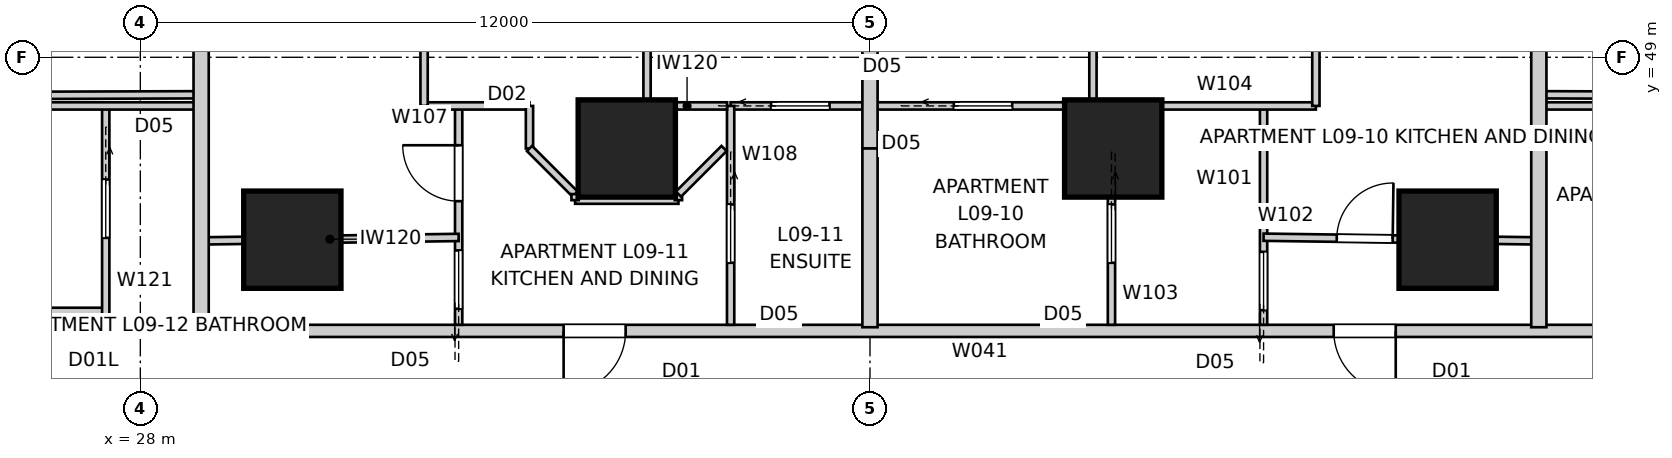
"""IFC4 building model, lengths in metres.
Left out: names, types, materials, properties, quantities, classifications, styles, units other than length and angle.
Written with IfcOpenShell. Run it as: python <this file> out.ifc"""

import sys

from ifc_helpers import new_model, si_unit, direction, frame, frame_2d, origin, origin_2d, place, context, subcontext, project, spatial, rectangle, extrude, element, fill, save


model = new_model("IFC4")
c1 = context("Model", 3, precision=1e-05, world=origin(), true_north=direction((0.0, 1.0)))
c2 = subcontext(c1, "Body", "Model", "MODEL_VIEW")
j1 = project(units=[si_unit("LENGTHUNIT", "METRE"), si_unit("PLANEANGLEUNIT", "RADIAN")], contexts=[c1])
p1 = place(None, origin())
s1 = spatial("IfcSite", under=j1, at=p1, CompositionType="ELEMENT")
p2 = place(p1, origin())
s2 = spatial("IfcBuilding", under=s1, at=p2, CompositionType="ELEMENT")
p3 = place(p2, frame((0.0, 0.0, 35.4)))
s3 = spatial("IfcBuildingStorey", under=s2, at=p3, CompositionType="ELEMENT", Elevation=35.4)
for number, where, z_axis, x_axis in (
    (1, (49.5, 46.0, 0.0), (0.0, 0.0, 1.0), (1.0, 0.0, 0.0)),
    (2, (44.0, 47.5, 0.0), (0.0, 0.0, 1.0), (1.0, 0.0, 0.0)),
    (3, (36.0, 47.5, 0.0), (0.0, 0.0, 1.0), (1.0, 0.0, 0.0)),
    (4, (30.5, 46.0, 0.0), (0.0, 0.0, 1.0), (1.0, 0.0, 0.0)),
):
    element("IfcColumn", number, at=place(p3, frame(where, z_axis=z_axis, x_axis=x_axis)), inside=s3, PredefinedType="COLUMN", context=c2, shape_type="SweptSolid", body=[
        extrude(rectangle(XDim=1.6, YDim=1.6, at=origin_2d()), origin(), (0.0, 0.0, 1.0), 3.4),
    ])
p4 = place(p3, frame((54.5, 44.5, 0.0), z_axis=(0.0, 0.0, 1.0), x_axis=(-1.0, 0.0, 0.0)))
e5 = element("IfcWall", 5, at=p4, inside=s3, PredefinedType="PARTITIONING", context=c2, shape_type="SweptSolid", body=[
    extrude(rectangle(XDim=28.2, YDim=0.2, at=frame_2d((14.1, 0.0))), origin(), (0.0, 0.0, 1.0), 3.25),
])
p5 = place(p4, frame((5.854, 0.0, 0.0)))
e6 = element("IfcOpeningElement", 6, at=p5, cuts=e5, PredefinedType="OPENING", context=c2, shape_type="SweptSolid", body=[
    extrude(rectangle(XDim=1.02, YDim=2.34, at=frame_2d((0.51, 1.17))), frame((0.0, 0.11, 0.0), z_axis=(0.0, -1.0, 0.0), x_axis=(1.0, 0.0, 0.0)), (0.0, 0.0, 1.0), 0.22),
])
p6 = place(p4, frame((18.518, 0.0, 0.0)))
e7 = element("IfcOpeningElement", 7, at=p6, cuts=e5, PredefinedType="OPENING", context=c2, shape_type="SweptSolid", body=[
    extrude(rectangle(XDim=1.02, YDim=2.34, at=frame_2d((0.51, 1.17))), frame((0.0, 0.11, 0.0), z_axis=(0.0, -1.0, 0.0), x_axis=(1.0, 0.0, 0.0)), (0.0, 0.0, 1.0), 0.22),
])
p7 = place(p4, frame((1.415, 0.0, 0.0)))
e8 = element("IfcOpeningElement", 8, at=p7, cuts=e5, PredefinedType="OPENING", context=c2, shape_type="SweptSolid", body=[
    extrude(rectangle(XDim=1.02, YDim=2.34, at=frame_2d((0.51, 1.17))), frame((0.0, 0.11, 0.0), z_axis=(0.0, -1.0, 0.0), x_axis=(1.0, 0.0, 0.0)), (0.0, 0.0, 1.0), 0.22),
])
for number, where, z_axis, x_axis in (
    (9, (51.0, 56.0, 0.0), (0.0, 0.0, 1.0), (0.0, -1.0, 0.0)),
    (10, (29.0, 56.0, 0.0), (0.0, 0.0, 1.0), (0.0, -1.0, 0.0)),
):
    element("IfcWall", number, at=place(p3, frame(where, z_axis=z_axis, x_axis=x_axis)), inside=s3, PredefinedType="PARTITIONING", context=c2, shape_type="SweptSolid", body=[
        extrude(rectangle(XDim=11.44, YDim=0.25, at=frame_2d((5.72, 0.0))), origin(), (0.0, 0.0, 1.0), 3.25),
    ])
p8 = place(p3, frame((40.0, 56.0, 0.0), z_axis=(0.0, 0.0, 1.0), x_axis=(0.0, -1.0, 0.0)))
e11 = element("IfcWall", 11, at=p8, inside=s3, PredefinedType="PARTITIONING", context=c2, shape_type="SweptSolid", body=[
    extrude(rectangle(XDim=8.5, YDim=0.25, at=frame_2d((4.25, 0.0))), origin(), (0.0, 0.0, 1.0), 3.25),
])
p9 = place(p3, frame((40.0, 47.5, 0.0), z_axis=(0.0, 0.0, 1.0), x_axis=(0.0, -1.0, 0.0)))
e12 = element("IfcWall", 12, at=p9, inside=s3, PredefinedType="PARTITIONING", context=c2, shape_type="SweptSolid", body=[
    extrude(rectangle(XDim=2.94, YDim=0.25, at=frame_2d((1.47, 0.0))), origin(), (0.0, 0.0, 1.0), 2.796),
])
p10 = place(p3, frame((51.0, 48.2, 0.0), z_axis=(0.0, 0.0, 1.0), x_axis=(1.0, 0.0, 0.0)))
e13 = element("IfcWall", 13, at=p10, inside=s3, PredefinedType="PARTITIONING", context=c2, shape_type="SweptSolid", body=[
    extrude(rectangle(XDim=7.2, YDim=0.12, at=frame_2d((3.6, 0.0))), origin(), (0.0, 0.0, 1.0), 3.25),
])
p11 = place(p3, frame((51.0, 48.383, 0.0), z_axis=(0.0, 0.0, 1.0), x_axis=(0.9999944038, -0.003345499915, 0.0)))
e14 = element("IfcWall", 14, at=p11, inside=s3, PredefinedType="PARTITIONING", context=c2, shape_type="SweptSolid", body=[
    extrude(rectangle(XDim=14.96, YDim=0.12, at=frame_2d((7.48, 0.0))), origin(), (0.0, 0.0, 1.0), 3.25),
])
p12 = place(p11, frame((12.515, 0.0, 0.0)))
e15 = element("IfcOpeningElement", 15, at=p12, cuts=e14, PredefinedType="OPENING", context=c2, shape_type="SweptSolid", body=[
    extrude(rectangle(XDim=0.92, YDim=2.34, at=frame_2d((0.46, 1.17))), frame((0.0, 0.07, 0.0), z_axis=(0.0, -1.0, 0.0), x_axis=(1.0, 0.0, 0.0)), (0.0, 0.0, 1.0), 0.14),
])
p13 = place(p11, frame((8.732, 0.0, 0.0)))
e16 = element("IfcOpeningElement", 16, at=p13, cuts=e14, PredefinedType="OPENING", context=c2, shape_type="SweptSolid", body=[
    extrude(rectangle(XDim=0.92, YDim=2.34, at=frame_2d((0.46, 1.17))), frame((0.0, 0.07, 0.0), z_axis=(0.0, -1.0, 0.0), x_axis=(1.0, 0.0, 0.0)), (0.0, 0.0, 1.0), 0.14),
])
p14 = place(p3, frame((46.473, 44.6, 0.0), z_axis=(0.0, 0.0, 1.0), x_axis=(0.0, 1.0, 0.0)))
e17 = element("IfcWall", 17, at=p14, inside=s3, PredefinedType="PARTITIONING", context=c2, shape_type="SweptSolid", body=[
    extrude(rectangle(XDim=3.6, YDim=0.12, at=frame_2d((1.8, 0.0))), origin(), (0.0, 0.0, 1.0), 3.25),
])
p15 = place(p14, frame((0.24, 0.0, 0.0)))
e18 = element("IfcOpeningElement", 18, at=p15, cuts=e17, PredefinedType="OPENING", context=c2, shape_type="SweptSolid", body=[
    extrude(rectangle(XDim=0.96, YDim=2.1, at=frame_2d((0.48, 1.05))), frame((0.0, 0.07, 0.0), z_axis=(0.0, -1.0, 0.0), x_axis=(1.0, 0.0, 0.0)), (0.0, 0.0, 1.0), 0.14),
])
p16 = place(p3, frame((46.473, 46.041, 0.0), z_axis=(0.0, 0.0, 1.0), x_axis=(0.999909127846, -0.013480951408, 0.0)))
e19 = element("IfcWall", 19, at=p16, inside=s3, PredefinedType="PARTITIONING", context=c2, shape_type="SweptSolid", body=[
    extrude(rectangle(XDim=4.528, YDim=0.12, at=frame_2d((2.264, 0.0))), origin(), (0.0, 0.0, 1.0), 2.549),
])
p17 = place(p16, frame((1.204, 0.0, 0.0)))
e20 = element("IfcOpeningElement", 20, at=p17, cuts=e19, PredefinedType="OPENING", context=c2, shape_type="SweptSolid", body=[
    extrude(rectangle(XDim=0.92, YDim=2.34, at=frame_2d((0.46, 1.17))), frame((0.0, 0.07, 0.0), z_axis=(0.0, -1.0, 0.0), x_axis=(1.0, 0.0, 0.0)), (0.0, 0.0, 1.0), 0.14),
])
p18 = place(p3, frame((43.971, 48.2, 0.0), z_axis=(0.0, 0.0, 1.0), x_axis=(0.0, -1.0, 0.0)))
e21 = element("IfcWall", 21, at=p18, inside=s3, PredefinedType="PARTITIONING", context=c2, shape_type="SweptSolid", body=[
    extrude(rectangle(XDim=3.6, YDim=0.12, at=frame_2d((1.8, 0.0))), origin(), (0.0, 0.0, 1.0), 3.25),
])
p19 = place(p18, frame((1.62, 0.0, 0.0)))
e22 = element("IfcOpeningElement", 22, at=p19, cuts=e21, PredefinedType="OPENING", context=c2, shape_type="SweptSolid", body=[
    extrude(rectangle(XDim=0.96, YDim=2.1, at=frame_2d((0.48, 1.05))), frame((0.0, 0.07, 0.0), z_axis=(0.0, -1.0, 0.0), x_axis=(1.0, 0.0, 0.0)), (0.0, 0.0, 1.0), 0.14),
])
p20 = place(p3, frame((37.708, 48.2, 0.0), z_axis=(0.0, 0.0, 1.0), x_axis=(1.0, 0.0, 0.0)))
e23 = element("IfcWall", 23, at=p20, inside=s3, PredefinedType="PARTITIONING", context=c2, shape_type="SweptSolid", body=[
    extrude(rectangle(XDim=9.625, YDim=0.12, at=frame_2d((4.812, 0.0))), origin(), (0.0, 0.0, 1.0), 3.25),
])
p21 = place(p20, frame((0.666, 0.0, 0.0)))
e24 = element("IfcOpeningElement", 24, at=p21, cuts=e23, PredefinedType="OPENING", context=c2, shape_type="SweptSolid", body=[
    extrude(rectangle(XDim=0.96, YDim=2.1, at=frame_2d((0.48, 1.05))), frame((0.0, 0.07, 0.0), z_axis=(0.0, -1.0, 0.0), x_axis=(1.0, 0.0, 0.0)), (0.0, 0.0, 1.0), 0.14),
])
p22 = place(p20, frame((3.67, 0.0, 0.0)))
e25 = element("IfcOpeningElement", 25, at=p22, cuts=e23, PredefinedType="OPENING", context=c2, shape_type="SweptSolid", body=[
    extrude(rectangle(XDim=0.96, YDim=2.1, at=frame_2d((0.48, 1.05))), frame((0.0, 0.07, 0.0), z_axis=(0.0, -1.0, 0.0), x_axis=(1.0, 0.0, 0.0)), (0.0, 0.0, 1.0), 0.14),
])
p23 = place(p3, frame((47.333, 48.2, 0.0), z_axis=(0.0, 0.0, 1.0), x_axis=(0.0, 1.0, 0.0)))
e26 = element("IfcWall", 26, at=p23, inside=s3, PredefinedType="PARTITIONING", context=c2, shape_type="SweptSolid", body=[
    extrude(rectangle(XDim=7.76, YDim=0.12, at=frame_2d((3.88, 0.0))), origin(), (0.0, 0.0, 1.0), 3.25),
])
p24 = place(p23, frame((3.44, 0.0, 0.0)))
e27 = element("IfcOpeningElement", 27, at=p24, cuts=e26, PredefinedType="OPENING", context=c2, shape_type="SweptSolid", body=[
    extrude(rectangle(XDim=0.92, YDim=2.34, at=frame_2d((0.46, 1.17))), frame((0.0, 0.07, 0.0), z_axis=(0.0, -1.0, 0.0), x_axis=(1.0, 0.0, 0.0)), (0.0, 0.0, 1.0), 0.14),
])
p25 = place(p3, frame((43.667, 55.96, 0.0), z_axis=(0.0, 0.0, 1.0), x_axis=(0.0, -1.0, 0.0)))
e28 = element("IfcWall", 28, at=p25, inside=s3, PredefinedType="PARTITIONING", context=c2, shape_type="SweptSolid", body=[
    extrude(rectangle(XDim=7.76, YDim=0.12, at=frame_2d((3.88, 0.0))), origin(), (0.0, 0.0, 1.0), 3.25),
])
p26 = place(p3, frame((33.235, 44.6, 0.0), z_axis=(0.0, 0.0, 1.0), x_axis=(0.0, 1.0, 0.0)))
e29 = element("IfcWall", 29, at=p26, inside=s3, PredefinedType="PARTITIONING", context=c2, shape_type="SweptSolid", body=[
    extrude(rectangle(XDim=3.6, YDim=0.12, at=frame_2d((1.8, 0.0))), origin(), (0.0, 0.0, 1.0), 3.25),
])
p27 = place(p26, frame((2.033, 0.0, 0.0)))
e30 = element("IfcOpeningElement", 30, at=p27, cuts=e29, PredefinedType="OPENING", context=c2, shape_type="SweptSolid", body=[
    extrude(rectangle(XDim=0.92, YDim=2.34, at=frame_2d((0.46, 1.17))), frame((0.0, 0.07, 0.0), z_axis=(0.0, -1.0, 0.0), x_axis=(1.0, 0.0, 0.0)), (0.0, 0.0, 1.0), 0.14),
])
p28 = place(p26, frame((0.263, 0.0, 0.0)))
e31 = element("IfcOpeningElement", 31, at=p28, cuts=e29, PredefinedType="OPENING", context=c2, shape_type="SweptSolid", body=[
    extrude(rectangle(XDim=0.96, YDim=2.1, at=frame_2d((0.48, 1.05))), frame((0.0, 0.07, 0.0), z_axis=(0.0, -1.0, 0.0), x_axis=(1.0, 0.0, 0.0)), (0.0, 0.0, 1.0), 0.14),
])
p29 = place(p3, frame((37.708, 48.2, 0.0), z_axis=(0.0, 0.0, 1.0), x_axis=(0.0, -1.0, 0.0)))
e32 = element("IfcWall", 32, at=p29, inside=s3, PredefinedType="PARTITIONING", context=c2, shape_type="SweptSolid", body=[
    extrude(rectangle(XDim=3.6, YDim=0.12, at=frame_2d((1.8, 0.0))), origin(), (0.0, 0.0, 1.0), 3.25),
])
p30 = place(p29, frame((1.62, 0.0, 0.0)))
e33 = element("IfcOpeningElement", 33, at=p30, cuts=e32, PredefinedType="OPENING", context=c2, shape_type="SweptSolid", body=[
    extrude(rectangle(XDim=0.96, YDim=2.1, at=frame_2d((0.48, 1.05))), frame((0.0, 0.07, 0.0), z_axis=(0.0, -1.0, 0.0), x_axis=(1.0, 0.0, 0.0)), (0.0, 0.0, 1.0), 0.14),
])
p31 = place(p3, frame((32.667, 48.2, 0.0), z_axis=(0.0, 0.0, 1.0), x_axis=(1.0, 0.0, 0.0)))
e34 = element("IfcWall", 34, at=p31, inside=s3, PredefinedType="PARTITIONING", context=c2, shape_type="SweptSolid", body=[
    extrude(rectangle(XDim=1.733, YDim=0.12, at=frame_2d((0.867, 0.0))), origin(), (0.0, 0.0, 1.0), 3.25),
])
p32 = place(p3, frame((34.4, 48.2, 0.0), z_axis=(0.0, 0.0, 1.0), x_axis=(0.0, -1.0, 0.0)))
e35 = element("IfcWall", 35, at=p32, inside=s3, PredefinedType="PARTITIONING", context=c2, shape_type="SweptSolid", body=[
    extrude(rectangle(XDim=0.7, YDim=0.12, at=frame_2d((0.35, 0.0))), origin(), (0.0, 0.0, 1.0), 3.25),
])
p33 = place(p3, frame((34.4, 47.5, 0.0), z_axis=(0.0, 0.0, 1.0), x_axis=(0.707106781187, -0.707106781187, 0.0)))
e36 = element("IfcWall", 36, at=p33, inside=s3, PredefinedType="PARTITIONING", context=c2, shape_type="SweptSolid", body=[
    extrude(rectangle(XDim=1.061, YDim=0.12, at=frame_2d((0.53, 0.0))), origin(), (0.0, 0.0, 1.0), 3.25),
])
p34 = place(p3, frame((35.15, 46.65, 0.0), z_axis=(0.0, 0.0, 1.0), x_axis=(1.0, 0.0, 0.0)))
e37 = element("IfcWall", 37, at=p34, inside=s3, PredefinedType="PARTITIONING", context=c2, shape_type="SweptSolid", body=[
    extrude(rectangle(XDim=1.7, YDim=0.12, at=frame_2d((0.85, 0.0))), origin(), (0.0, 0.0, 1.0), 3.25),
])
p35 = place(p3, frame((36.85, 46.75, 0.0), z_axis=(0.0, 0.0, 1.0), x_axis=(0.707106781187, 0.707106781187, 0.0)))
e38 = element("IfcWall", 38, at=p35, inside=s3, PredefinedType="PARTITIONING", context=c2, shape_type="SweptSolid", body=[
    extrude(rectangle(XDim=1.061, YDim=0.12, at=frame_2d((0.53, 0.0))), origin(), (0.0, 0.0, 1.0), 3.25),
])
p36 = place(p3, frame((29.0, 45.98, 0.0), z_axis=(0.0, 0.0, 1.0), x_axis=(0.999909030942, 0.01348813704, 0.0)))
e39 = element("IfcWall", 39, at=p36, inside=s3, PredefinedType="PARTITIONING", context=c2, shape_type="SweptSolid", body=[
    extrude(rectangle(XDim=4.236, YDim=0.12, at=frame_2d((2.118, 0.0))), origin(), (0.0, 0.0, 1.0), 2.549),
])
p37 = place(p3, frame((37.65, 48.2, 0.0), z_axis=(0.0, 0.0, 1.0), x_axis=(-1.0, 0.0, 0.0)))
e40 = element("IfcWall", 40, at=p37, inside=s3, PredefinedType="PARTITIONING", context=c2, shape_type="SweptSolid", body=[
    extrude(rectangle(XDim=1.317, YDim=0.12, at=frame_2d((0.658, 0.0))), origin(), (0.0, 0.0, 1.0), 3.25),
])
p38 = place(p3, frame((36.333, 48.2, 0.0), z_axis=(0.0, 0.0, 1.0), x_axis=(0.0, 1.0, 0.0)))
e41 = element("IfcWall", 41, at=p38, inside=s3, PredefinedType="PARTITIONING", context=c2, shape_type="SweptSolid", body=[
    extrude(rectangle(XDim=7.76, YDim=0.12, at=frame_2d((3.88, 0.0))), origin(), (0.0, 0.0, 1.0), 3.25),
])
p39 = place(p38, frame((3.44, 0.0, 0.0)))
e42 = element("IfcOpeningElement", 42, at=p39, cuts=e41, PredefinedType="OPENING", context=c2, shape_type="SweptSolid", body=[
    extrude(rectangle(XDim=0.92, YDim=2.34, at=frame_2d((0.46, 1.17))), frame((0.0, 0.07, 0.0), z_axis=(0.0, -1.0, 0.0), x_axis=(1.0, 0.0, 0.0)), (0.0, 0.0, 1.0), 0.14),
])
p40 = place(p3, frame((32.667, 55.96, 0.0), z_axis=(0.0, 0.0, 1.0), x_axis=(0.0, -1.0, 0.0)))
e43 = element("IfcWall", 43, at=p40, inside=s3, PredefinedType="PARTITIONING", context=c2, shape_type="SweptSolid", body=[
    extrude(rectangle(XDim=7.76, YDim=0.12, at=frame_2d((3.88, 0.0))), origin(), (0.0, 0.0, 1.0), 3.25),
])
p41 = place(p3, frame((21.8, 44.821, 0.0), z_axis=(0.0, 0.0, 1.0), x_axis=(1.0, 0.0, 0.0)))
e44 = element("IfcWall", 44, at=p41, inside=s3, PredefinedType="PARTITIONING", context=c2, shape_type="SweptSolid", body=[
    extrude(rectangle(XDim=5.631, YDim=0.12, at=frame_2d((2.815, 0.0))), origin(), (0.0, 0.0, 1.0), 3.25),
])
p42 = place(p41, frame((2.355, 0.0, 0.0)))
e45 = element("IfcOpeningElement", 45, at=p42, cuts=e44, PredefinedType="OPENING", context=c2, shape_type="SweptSolid", body=[
    extrude(rectangle(XDim=0.92, YDim=2.34, at=frame_2d((0.46, 1.17))), frame((0.0, 0.07, 0.0), z_axis=(0.0, -1.0, 0.0), x_axis=(1.0, 0.0, 0.0)), (0.0, 0.0, 1.0), 0.14),
])
p43 = place(p3, frame((27.431, 48.2, 0.0), z_axis=(0.0, 0.0, 1.0), x_axis=(0.0, -1.0, 0.0)))
e46 = element("IfcWall", 46, at=p43, inside=s3, PredefinedType="PARTITIONING", context=c2, shape_type="SweptSolid", body=[
    extrude(rectangle(XDim=3.6, YDim=0.12, at=frame_2d((1.8, 0.0))), origin(), (0.0, 0.0, 1.0), 3.25),
])
p44 = place(p43, frame((1.209, 0.0, 0.0)))
e47 = element("IfcOpeningElement", 47, at=p44, cuts=e46, PredefinedType="OPENING", context=c2, shape_type="SweptSolid", body=[
    extrude(rectangle(XDim=0.96, YDim=2.1, at=frame_2d((0.48, 1.05))), frame((0.0, 0.07, 0.0), z_axis=(0.0, -1.0, 0.0), x_axis=(1.0, 0.0, 0.0)), (0.0, 0.0, 1.0), 0.14),
])
p45 = place(p3, frame((21.8, 48.2, 0.0), z_axis=(0.0, 0.0, 1.0), x_axis=(1.0, 0.0, 0.0)))
e48 = element("IfcWall", 48, at=p45, inside=s3, PredefinedType="PARTITIONING", context=c2, shape_type="SweptSolid", body=[
    extrude(rectangle(XDim=7.2, YDim=0.12, at=frame_2d((3.6, 0.0))), origin(), (0.0, 0.0, 1.0), 3.25),
])
p46 = place(p3, frame((14.04, 48.333, 0.0), z_axis=(0.0, 0.0, 1.0), x_axis=(0.9999944038, 0.003345499915, 0.0)))
e49 = element("IfcWall", 49, at=p46, inside=s3, PredefinedType="PARTITIONING", context=c2, shape_type="SweptSolid", body=[
    extrude(rectangle(XDim=14.96, YDim=0.12, at=frame_2d((7.48, 0.0))), origin(), (0.0, 0.0, 1.0), 3.25),
])
p47 = place(p46, frame((3.333, 0.0, 0.0)))
e50 = element("IfcOpeningElement", 50, at=p47, cuts=e49, PredefinedType="OPENING", context=c2, shape_type="SweptSolid", body=[
    extrude(rectangle(XDim=0.92, YDim=2.34, at=frame_2d((0.46, 1.17))), frame((0.0, 0.07, 0.0), z_axis=(0.0, -1.0, 0.0), x_axis=(1.0, 0.0, 0.0)), (0.0, 0.0, 1.0), 0.14),
])
for number, where, z_axis, x_axis in (
    (51, (35.15, 46.65, 0.0), (0.0, 0.0, 1.0), (0.0, 1.0, 0.0)),
    (52, (36.85, 46.65, 0.0), (0.0, 0.0, 1.0), (0.0, 1.0, 0.0)),
):
    element("IfcWall", number, at=place(p3, frame(where, z_axis=z_axis, x_axis=x_axis)), inside=s3, PredefinedType="PARTITIONING", context=c2, shape_type="SweptSolid", body=[
        extrude(rectangle(XDim=0.1, YDim=0.12, at=frame_2d((0.05, 0.0))), origin(), (0.0, 0.0, 1.0), 3.25),
    ])
p48 = place(p5, origin())
e53 = element("IfcDoor", 53, at=p48, inside=s3, OperationType="SINGLE_SWING_LEFT", PredefinedType="DOOR", context=c2, shape_type="SweptSolid", body=[
    extrude(rectangle(XDim=1.02, YDim=2.34, at=frame_2d((0.51, 1.17))), frame((0.0, 0.025, 0.0), z_axis=(0.0, -1.0, 0.0), x_axis=(1.0, 0.0, 0.0)), (0.0, 0.0, 1.0), 0.05),
])
fill(e6, e53)
p49 = place(p6, origin())
e54 = element("IfcDoor", 54, at=p49, inside=s3, OperationType="SINGLE_SWING_RIGHT", PredefinedType="DOOR", context=c2, shape_type="SweptSolid", body=[
    extrude(rectangle(XDim=1.02, YDim=2.34, at=frame_2d((0.51, 1.17))), frame((0.0, 0.025, 0.0), z_axis=(0.0, -1.0, 0.0), x_axis=(1.0, 0.0, 0.0)), (0.0, 0.0, 1.0), 0.05),
])
fill(e7, e54)
p50 = place(p17, origin())
e55 = element("IfcDoor", 55, at=p50, inside=s3, OperationType="SINGLE_SWING_RIGHT", PredefinedType="DOOR", context=c2, shape_type="SweptSolid", body=[
    extrude(rectangle(XDim=0.92, YDim=2.34, at=frame_2d((0.46, 1.17))), frame((0.0, 0.025, 0.0), z_axis=(0.0, -1.0, 0.0), x_axis=(1.0, 0.0, 0.0)), (0.0, 0.0, 1.0), 0.05),
])
fill(e20, e55)
p51 = place(p15, origin())
e56 = element("IfcDoor", 56, at=p51, inside=s3, OperationType="SLIDING_TO_LEFT", PredefinedType="DOOR", context=c2, shape_type="SweptSolid", body=[
    extrude(rectangle(XDim=0.96, YDim=2.1, at=frame_2d((0.48, 1.05))), frame((0.0, 0.025, 0.0), z_axis=(0.0, -1.0, 0.0), x_axis=(1.0, 0.0, 0.0)), (0.0, 0.0, 1.0), 0.05),
])
fill(e18, e56)
p52 = place(p30, origin())
e57 = element("IfcDoor", 57, at=p52, inside=s3, OperationType="SLIDING_TO_LEFT", PredefinedType="DOOR", context=c2, shape_type="SweptSolid", body=[
    extrude(rectangle(XDim=0.96, YDim=2.1, at=frame_2d((0.48, 1.05))), frame((0.0, 0.025, 0.0), z_axis=(0.0, -1.0, 0.0), x_axis=(1.0, 0.0, 0.0)), (0.0, 0.0, 1.0), 0.05),
])
fill(e33, e57)
p53 = place(p27, origin())
e58 = element("IfcDoor", 58, at=p53, inside=s3, OperationType="SINGLE_SWING_RIGHT", PredefinedType="DOOR", context=c2, shape_type="SweptSolid", body=[
    extrude(rectangle(XDim=0.92, YDim=2.34, at=frame_2d((0.46, 1.17))), frame((0.0, 0.025, 0.0), z_axis=(0.0, -1.0, 0.0), x_axis=(1.0, 0.0, 0.0)), (0.0, 0.0, 1.0), 0.05),
])
fill(e30, e58)
p54 = place(p28, origin())
e59 = element("IfcDoor", 59, at=p54, inside=s3, OperationType="SLIDING_TO_LEFT", PredefinedType="DOOR", context=c2, shape_type="SweptSolid", body=[
    extrude(rectangle(XDim=0.96, YDim=2.1, at=frame_2d((0.48, 1.05))), frame((0.0, 0.025, 0.0), z_axis=(0.0, -1.0, 0.0), x_axis=(1.0, 0.0, 0.0)), (0.0, 0.0, 1.0), 0.05),
])
fill(e31, e59)
p55 = place(p19, origin())
e60 = element("IfcDoor", 60, at=p55, inside=s3, OperationType="SLIDING_TO_LEFT", PredefinedType="DOOR", context=c2, shape_type="SweptSolid", body=[
    extrude(rectangle(XDim=0.96, YDim=2.1, at=frame_2d((0.48, 1.05))), frame((0.0, 0.025, 0.0), z_axis=(0.0, -1.0, 0.0), x_axis=(1.0, 0.0, 0.0)), (0.0, 0.0, 1.0), 0.05),
])
fill(e22, e60)
p56 = place(p21, origin())
e61 = element("IfcDoor", 61, at=p56, inside=s3, OperationType="SLIDING_TO_LEFT", PredefinedType="DOOR", context=c2, shape_type="SweptSolid", body=[
    extrude(rectangle(XDim=0.96, YDim=2.1, at=frame_2d((0.48, 1.05))), frame((0.0, 0.025, 0.0), z_axis=(0.0, -1.0, 0.0), x_axis=(1.0, 0.0, 0.0)), (0.0, 0.0, 1.0), 0.05),
])
fill(e24, e61)
p57 = place(p44, origin())
e62 = element("IfcDoor", 62, at=p57, inside=s3, OperationType="SLIDING_TO_LEFT", PredefinedType="DOOR", context=c2, shape_type="SweptSolid", body=[
    extrude(rectangle(XDim=0.96, YDim=2.1, at=frame_2d((0.48, 1.05))), frame((0.0, 0.025, 0.0), z_axis=(0.0, -1.0, 0.0), x_axis=(1.0, 0.0, 0.0)), (0.0, 0.0, 1.0), 0.05),
])
fill(e47, e62)
p58 = place(p22, origin())
e63 = element("IfcDoor", 63, at=p58, inside=s3, OperationType="SLIDING_TO_LEFT", PredefinedType="DOOR", context=c2, shape_type="SweptSolid", body=[
    extrude(rectangle(XDim=0.96, YDim=2.1, at=frame_2d((0.48, 1.05))), frame((0.0, 0.025, 0.0), z_axis=(0.0, -1.0, 0.0), x_axis=(1.0, 0.0, 0.0)), (0.0, 0.0, 1.0), 0.05),
])
fill(e25, e63)
save(model, sys.argv[1])
